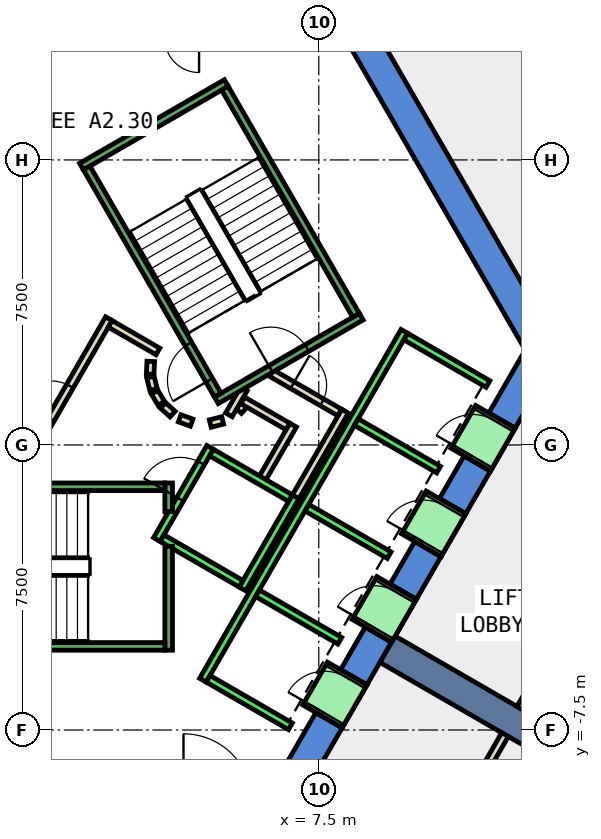
"""IFC4 building model, lengths in metres.
Left out: names, types, materials, properties, quantities, classifications, styles, units other than length and angle.
Written with IfcOpenShell. Run it as: python <this file> out.ifc"""

import sys

from ifc_helpers import new_model, si_unit, direction, frame, frame_2d, origin, place, context, subcontext, project, spatial, polyline, rectangle, outline, extrude, element, fill, save


model = new_model("IFC4")
c1 = context("Model", 3, precision=1e-05, world=origin(), true_north=direction((0.0, 1.0)))
c2 = subcontext(c1, "Body", "Model", "MODEL_VIEW")
j1 = project(units=[si_unit("LENGTHUNIT", "METRE"), si_unit("PLANEANGLEUNIT", "RADIAN")], contexts=[c1])
p1 = place(None, origin())
s1 = spatial("IfcSite", under=j1, at=p1, CompositionType="ELEMENT")
p2 = place(p1, origin())
s2 = spatial("IfcBuilding", under=s1, at=p2, CompositionType="ELEMENT")
p3 = place(p2, frame((0.0, 0.0, 146.6)))
s3 = spatial("IfcBuildingStorey", under=s2, at=p3, CompositionType="ELEMENT", Elevation=146.6)
p4 = place(p3, frame((0.0, 0.0, -0.4)))
e1 = element("IfcWall", 1, at=p4, inside=s3, PredefinedType="SHEAR", context=c2, shape_type="SweptSolid", body=[
    extrude(outline(polyline([(8.517, 11.748), (7.824, 11.348), (12.933, 2.5), (13.856, 2.5), (8.517, 11.748)])), origin(), (0.0, 0.0, 1.0), 4.2),
])
p5 = place(p3, frame((0.0, 0.0, -0.4)))
e2 = element("IfcWall", 2, at=p5, inside=s3, PredefinedType="SHEAR", context=c2, shape_type="SweptSolid", body=[
    extrude(outline(polyline([(8.117, -7.44), (7.424, -7.04), (6.466, -8.7), (6.928, -9.5), (8.117, -7.44)])), origin(), (0.0, 0.0, 1.0), 4.2),
])
p6 = place(p3, frame((0.0, 0.0, -0.4)))
e3 = element("IfcWall", 3, at=p6, inside=s3, PredefinedType="SHEAR", context=c2, shape_type="SweptSolid", body=[
    extrude(outline(polyline([(9.417, -5.189), (8.724, -4.789), (8.075, -5.914), (8.767, -6.314), (9.417, -5.189)])), origin(), (0.0, 0.0, 1.0), 4.2),
])
p7 = place(p3, frame((0.0, 0.0, -0.4)))
e4 = element("IfcWall", 4, at=p7, inside=s3, PredefinedType="SHEAR", context=c2, shape_type="SweptSolid", body=[
    extrude(outline(polyline([(10.717, -2.937), (10.025, -2.537), (9.374, -3.663), (10.067, -4.063), (10.717, -2.937)])), origin(), (0.0, 0.0, 1.0), 4.2),
])
p8 = place(p3, frame((0.0, 0.0, -0.4)))
e5 = element("IfcWall", 5, at=p8, inside=s3, PredefinedType="SHEAR", context=c2, shape_type="SweptSolid", body=[
    extrude(outline(polyline([(12.017, -0.686), (11.324, -0.286), (10.675, -1.411), (11.367, -1.811), (12.017, -0.686)])), origin(), (0.0, 0.0, 1.0), 4.2),
])
p9 = place(p3, frame((0.0, 0.0, -0.4)))
e6 = element("IfcWall", 6, at=p9, inside=s3, PredefinedType="SHEAR", context=c2, shape_type="SweptSolid", body=[
    extrude(outline(polyline([(11.974, 0.84), (12.667, 0.44), (13.856, 2.5), (12.933, 2.5), (11.974, 0.84)])), origin(), (0.0, 0.0, 1.0), 4.2),
])
p10 = place(p3, frame((0.0, 0.0, 3.6)))
e7 = element("IfcWall", 7, at=p10, inside=s3, PredefinedType="SHEAR", context=c2, shape_type="SweptSolid", body=[
    extrude(outline(polyline([(8.767, -6.314), (8.075, -5.914), (7.424, -7.04), (8.117, -7.44), (8.767, -6.314)])), origin(), (0.0, 0.0, 1.0), 0.2),
])
p11 = place(p3, frame((0.0, 0.0, 3.6)))
e8 = element("IfcWall", 8, at=p11, inside=s3, PredefinedType="SHEAR", context=c2, shape_type="SweptSolid", body=[
    extrude(outline(polyline([(10.067, -4.063), (9.374, -3.663), (8.724, -4.789), (9.417, -5.189), (10.067, -4.063)])), origin(), (0.0, 0.0, 1.0), 0.2),
])
p12 = place(p3, frame((0.0, 0.0, 3.6)))
e9 = element("IfcWall", 9, at=p12, inside=s3, PredefinedType="SHEAR", context=c2, shape_type="SweptSolid", body=[
    extrude(outline(polyline([(11.367, -1.811), (10.675, -1.411), (10.025, -2.537), (10.717, -2.937), (11.367, -1.811)])), origin(), (0.0, 0.0, 1.0), 0.2),
])
p13 = place(p3, frame((0.0, 0.0, 3.6)))
e10 = element("IfcWall", 10, at=p13, inside=s3, PredefinedType="SHEAR", context=c2, shape_type="SweptSolid", body=[
    extrude(outline(polyline([(12.667, 0.44), (11.974, 0.84), (11.324, -0.286), (12.017, -0.686), (12.667, 0.44)])), origin(), (0.0, 0.0, 1.0), 0.2),
])
p14 = place(p3, frame((9.31, -5.375, -0.4), z_axis=(0.0, 0.0, 1.0), x_axis=(0.866017533419, -0.500013631625, 0.0)))
e11 = element("IfcWall", 11, at=p14, inside=s3, PredefinedType="SHEAR", context=c2, shape_type="SweptSolid", body=[
    extrude(rectangle(XDim=9.0, YDim=0.8, at=frame_2d((4.5, 0.0))), origin(), (0.0, 0.0, 1.0), 4.2),
])
p15 = place(p3, frame((5.39, 0.898, 0.0), z_axis=(0.0, 0.0, 1.0), x_axis=(0.673828488714, 0.738887791073, 0.0)))
e12 = element("IfcWall", 12, at=p15, inside=s3, PredefinedType="PARTITIONING", context=c2, shape_type="SweptSolid", body=[
    extrude(rectangle(XDim=0.263, YDim=0.2, at=frame_2d((0.131, 0.0))), origin(), (0.0, 0.0, 1.0), 3.8),
])
p16 = place(p3, frame((5.499, 1.172, 0.0), z_axis=(0.0, 0.0, 1.0), x_axis=(0.866333505267, -0.499465972466, 0.0)))
e13 = element("IfcWall", 13, at=p16, inside=s3, PredefinedType="PARTITIONING", context=c2, shape_type="SweptSolid", body=[
    extrude(rectangle(XDim=1.374, YDim=0.2, at=frame_2d((0.687, 0.0))), origin(), (0.0, 0.0, 1.0), 3.8),
])
p17 = place(p3, frame((6.826, 0.522, 0.0), z_axis=(0.0, 0.0, 1.0), x_axis=(-0.500016722714, -0.866015748706, 0.0)))
e14 = element("IfcWall", 14, at=p17, inside=s3, PredefinedType="PARTITIONING", context=c2, shape_type="SweptSolid", body=[
    extrude(rectangle(XDim=1.7, YDim=0.2, at=frame_2d((0.85, 0.0))), origin(), (0.0, 0.0, 1.0), 3.8),
])
p18 = place(p3, frame((6.25, 1.894, 0.0), z_axis=(0.0, 0.0, 1.0), x_axis=(0.866043184279, -0.499969202016, 0.0)))
e15 = element("IfcWall", 15, at=p18, inside=s3, PredefinedType="PARTITIONING", context=c2, shape_type="SweptSolid", body=[
    extrude(rectangle(XDim=2.084, YDim=0.2, at=frame_2d((1.042, 0.0))), origin(), (0.0, 0.0, 1.0), 3.8),
])
p19 = place(p18, frame((0.642, 0.0, 0.0)))
e16 = element("IfcOpeningElement", 16, at=p19, cuts=e15, PredefinedType="OPENING", context=c2, shape_type="SweptSolid", body=[
    extrude(rectangle(XDim=0.9, YDim=2.1, at=frame_2d((0.45, 1.05))), frame((0.0, 0.11, 0.0), z_axis=(0.0, -1.0, 0.0), x_axis=(1.0, 0.0, 0.0)), (0.0, 0.0, 1.0), 0.22),
])
p20 = place(p3, frame((8.192, 0.888, 0.0), z_axis=(0.0, 0.0, 1.0), x_axis=(-0.499940625693, -0.866059680843, 0.0)))
e17 = element("IfcWall", 17, at=p20, inside=s3, PredefinedType="PARTITIONING", context=c2, shape_type="SweptSolid", body=[
    extrude(rectangle(XDim=2.68, YDim=0.2, at=frame_2d((1.34, 0.0))), origin(), (0.0, 0.0, 1.0), 3.8),
])
p21 = place(p3, frame((5.135, 0.793, 0.0), z_axis=(0.0, 0.0, 1.0), x_axis=(0.499526442893, 0.866298639529, 0.0)))
e18 = element("IfcWall", 18, at=p21, inside=s3, PredefinedType="PARTITIONING", context=c2, shape_type="SweptSolid", body=[
    extrude(rectangle(XDim=0.791, YDim=0.2, at=frame_2d((0.396, 0.0))), origin(), (0.0, 0.0, 1.0), 3.8),
])
p22 = place(p3, frame((-0.52, -1.0, 0.0), z_axis=(0.0, 0.0, 1.0), x_axis=(0.50011622646, 0.865958290007, 0.0)))
e19 = element("IfcWall", 19, at=p22, inside=s3, PredefinedType="PARTITIONING", context=c2, shape_type="SweptSolid", body=[
    extrude(rectangle(XDim=4.991, YDim=0.2, at=frame_2d((2.496, 0.0))), origin(), (0.0, 0.0, 1.0), 3.8),
])
p23 = place(p22, frame((1.945, 0.0, 0.0)))
e20 = element("IfcOpeningElement", 20, at=p23, cuts=e19, PredefinedType="OPENING", context=c2, shape_type="SweptSolid", body=[
    extrude(rectangle(XDim=1.0, YDim=2.1, at=frame_2d((0.5, 1.05))), frame((0.0, 0.11, 0.0), z_axis=(0.0, -1.0, 0.0), x_axis=(1.0, 0.0, 0.0)), (0.0, 0.0, 1.0), 0.22),
])
p24 = place(p3, frame((2.012, 3.186, 0.0), z_axis=(0.0, 0.0, 1.0), x_axis=(0.865891012941, -0.500232699559, 0.0)))
e21 = element("IfcWall", 21, at=p24, inside=s3, PredefinedType="PARTITIONING", context=c2, shape_type="SweptSolid", body=[
    extrude(rectangle(XDim=1.449, YDim=0.2, at=frame_2d((0.725, 0.0))), origin(), (0.0, 0.0, 1.0), 3.8),
])
p25 = place(p3, frame((3.079, 2.199, 0.0), z_axis=(0.0, 0.0, 1.0), x_axis=(-0.047771483479, -0.998858290933, 0.0)))
e22 = element("IfcWall", 22, at=p25, inside=s3, PredefinedType="PARTITIONING", context=c2, shape_type="SweptSolid", body=[
    extrude(rectangle(XDim=0.337, YDim=0.2, at=frame_2d((0.169, 0.0))), origin(), (0.0, 0.0, 1.0), 3.8),
])
p26 = place(p3, frame((3.07, 1.786, 0.0), z_axis=(0.0, 0.0, 1.0), x_axis=(0.242705583207, -0.970099994784, 0.0)))
e23 = element("IfcWall", 23, at=p26, inside=s3, PredefinedType="PARTITIONING", context=c2, shape_type="SweptSolid", body=[
    extrude(rectangle(XDim=0.338, YDim=0.2, at=frame_2d((0.169, 0.0))), origin(), (0.0, 0.0, 1.0), 3.8),
])
for number, where, z_axis, x_axis in (
    (24, (3.182, 1.388, 0.0), (0.0, 0.0, 1.0), (0.512, -0.859, 0.0)),
    (25, (3.404, 1.039, 0.0), (0.0, 0.0, 1.0), (0.74, -0.672, 0.0)),
):
    element("IfcWall", number, at=place(p3, frame(where, z_axis=z_axis, x_axis=x_axis)), inside=s3, PredefinedType="PARTITIONING", context=c2, shape_type="SweptSolid", body=[
        extrude(rectangle(XDim=0.338, YDim=0.2, at=frame_2d((0.169, 0.0))), origin(), (0.0, 0.0, 1.0), 3.8),
    ])
p27 = place(p3, frame((3.838, 0.702, 0.0), z_axis=(0.0, 0.0, 1.0), x_axis=(0.941035081519, -0.338308993895, 0.0)))
e26 = element("IfcWall", 26, at=p27, inside=s3, PredefinedType="PARTITIONING", context=c2, shape_type="SweptSolid", body=[
    extrude(rectangle(XDim=0.337, YDim=0.2, at=frame_2d((0.168, 0.0))), origin(), (0.0, 0.0, 1.0), 3.8),
])
p28 = place(p3, frame((4.644, 0.564, 0.0), z_axis=(0.0, 0.0, 1.0), x_axis=(0.969929076366, 0.243387729394, 0.0)))
e27 = element("IfcWall", 27, at=p28, inside=s3, PredefinedType="PARTITIONING", context=c2, shape_type="SweptSolid", body=[
    extrude(rectangle(XDim=0.337, YDim=0.2, at=frame_2d((0.168, 0.0))), origin(), (0.0, 0.0, 1.0), 3.8),
])
p29 = place(p3, frame((13.535, -5.657, 0.0), z_axis=(0.0, 0.0, 1.0), x_axis=(-0.499751238113, -0.866168978898, 0.0)))
e28 = element("IfcWall", 28, at=p29, inside=s3, PredefinedType="PARTITIONING", context=c2, shape_type="SweptSolid", body=[
    extrude(rectangle(XDim=1.469, YDim=0.2, at=frame_2d((0.734, 0.0))), origin(), (0.0, 0.0, 1.0), 3.8),
])
p30 = place(p3, frame((12.401, -7.621, 0.0), z_axis=(0.0, 0.0, 1.0), x_axis=(-0.499964151829, -0.866046099747, 0.0)))
e29 = element("IfcWall", 29, at=p30, inside=s3, PredefinedType="PARTITIONING", context=c2, shape_type="SweptSolid", body=[
    extrude(rectangle(XDim=8.656, YDim=0.2, at=frame_2d((4.328, 0.0))), origin(), (0.0, 0.0, 1.0), 3.8),
])
p31 = place(p30, frame((2.694, 0.0, 0.0)))
e30 = element("IfcOpeningElement", 30, at=p31, cuts=e29, PredefinedType="OPENING", context=c2, shape_type="SweptSolid", body=[
    extrude(rectangle(XDim=1.0, YDim=2.1, at=frame_2d((0.5, 1.05))), frame((0.0, 0.11, 0.0), z_axis=(0.0, -1.0, 0.0), x_axis=(1.0, 0.0, 0.0)), (0.0, 0.0, 1.0), 0.22),
])
p32 = place(p30, frame((3.794, 0.0, 0.0)))
e31 = element("IfcOpeningElement", 31, at=p32, cuts=e29, PredefinedType="OPENING", context=c2, shape_type="SweptSolid", body=[
    extrude(rectangle(XDim=1.0, YDim=2.1, at=frame_2d((0.5, 1.05))), frame((0.0, 0.11, 0.0), z_axis=(0.0, -1.0, 0.0), x_axis=(1.0, 0.0, 0.0)), (0.0, 0.0, 1.0), 0.22),
])
p33 = place(p3, frame((3.24, -2.488, 0.0), z_axis=(0.0, 0.0, 1.0), x_axis=(0.49994636267, 0.866056369097, 0.0)))
e32 = element("IfcWall", 32, at=p33, inside=s3, PredefinedType="STANDARD", context=c2, shape_type="SweptSolid", body=[
    extrude(rectangle(XDim=2.8, YDim=0.2, at=frame_2d((1.4, 0.0))), origin(), (0.0, 0.0, 1.0), 3.8),
])
p34 = place(p33, frame((1.225, 0.0, 0.0)))
e33 = element("IfcOpeningElement", 33, at=p34, cuts=e32, PredefinedType="OPENING", context=c2, shape_type="SweptSolid", body=[
    extrude(rectangle(XDim=1.1, YDim=2.1, at=frame_2d((0.55, 1.05))), frame((0.0, 0.11, 0.0), z_axis=(0.0, -1.0, 0.0), x_axis=(1.0, 0.0, 0.0)), (0.0, 0.0, 1.0), 0.22),
])
p35 = place(p3, frame((5.492, -3.788, 0.0), z_axis=(0.0, 0.0, 1.0), x_axis=(0.500011755427, 0.866018616679, 0.0)))
e34 = element("IfcWall", 34, at=p35, inside=s3, PredefinedType="STANDARD", context=c2, shape_type="SweptSolid", body=[
    extrude(rectangle(XDim=2.8, YDim=0.2, at=frame_2d((1.4, 0.0))), origin(), (0.0, 0.0, 1.0), 3.8),
])
p36 = place(p3, frame((3.377, -2.452, 0.0), z_axis=(0.0, 0.0, 1.0), x_axis=(0.865955154139, -0.50012165622, 0.0)))
e35 = element("IfcWall", 35, at=p36, inside=s3, PredefinedType="STANDARD", context=c2, shape_type="SweptSolid", body=[
    extrude(rectangle(XDim=2.4, YDim=0.2, at=frame_2d((1.2, 0.0))), origin(), (0.0, 0.0, 1.0), 3.8),
])
p37 = place(p3, frame((4.677, -0.2, 0.0), z_axis=(0.0, 0.0, 1.0), x_axis=(0.865973769406, -0.500089422704, 0.0)))
e36 = element("IfcWall", 36, at=p37, inside=s3, PredefinedType="STANDARD", context=c2, shape_type="SweptSolid", body=[
    extrude(rectangle(XDim=2.399, YDim=0.2, at=frame_2d((1.2, 0.0))), origin(), (0.0, 0.0, 1.0), 3.8),
])
p38 = place(p3, frame((4.451, -6.19, 0.0), z_axis=(0.0, 0.0, 1.0), x_axis=(0.50000090737, 0.866024879913, 0.0)))
e37 = element("IfcWall", 37, at=p38, inside=s3, PredefinedType="STANDARD", context=c2, shape_type="SweptSolid", body=[
    extrude(rectangle(XDim=10.6, YDim=0.2, at=frame_2d((5.3, 0.0))), origin(), (0.0, 0.0, 1.0), 3.8),
])
for number, where, z_axis, x_axis in (
    (38, (4.588, -6.153, 0.0), (0.0, 0.0, 1.0), (0.866, -0.5, 0.0)),
    (39, (5.888, -3.902, 0.0), (0.0, 0.0, 1.0), (0.866, -0.5, 0.0)),
    (40, (7.188, -1.65, 0.0), (0.0, 0.0, 1.0), (0.866, -0.5, 0.0)),
    (41, (8.488, 0.602, 0.0), (0.0, 0.0, 1.0), (0.866, -0.5, 0.0)),
):
    element("IfcWall", number, at=place(p3, frame(where, z_axis=z_axis, x_axis=x_axis)), inside=s3, PredefinedType="STANDARD", context=c2, shape_type="SweptSolid", body=[
        extrude(rectangle(XDim=2.5, YDim=0.2, at=frame_2d((1.25, 0.0))), origin(), (0.0, 0.0, 1.0), 3.8),
    ])
p39 = place(p3, frame((9.788, 2.853, 0.0), z_axis=(0.0, 0.0, 1.0), x_axis=(0.865998541277, -0.500046524342, 0.0)))
e42 = element("IfcWall", 42, at=p39, inside=s3, PredefinedType="STANDARD", context=c2, shape_type="SweptSolid", body=[
    extrude(rectangle(XDim=2.5, YDim=0.2, at=frame_2d((1.25, 0.0))), origin(), (0.0, 0.0, 1.0), 3.8),
])
p40 = place(p3, frame((7.598, -7.14, 0.0), z_axis=(0.0, 0.0, 1.0), x_axis=(0.500362116554, 0.865816234728, 0.0)))
e43 = element("IfcWall", 43, at=p40, inside=s3, PredefinedType="STANDARD", context=c2, shape_type="SweptSolid", body=[
    extrude(rectangle(XDim=1.299, YDim=1.2, at=frame_2d((0.65, 0.0))), origin(), (0.0, 0.0, 1.0), 2.4),
])
p41 = place(p40, frame((0.1, 0.0, 0.0)))
e44 = element("IfcOpeningElement", 44, at=p41, cuts=e43, PredefinedType="OPENING", context=c2, shape_type="SweptSolid", body=[
    extrude(rectangle(XDim=1.1, YDim=2.3, at=frame_2d((0.55, 1.15))), frame((0.0, 0.61, 0.0), z_axis=(0.0, -1.0, 0.0), x_axis=(1.0, 0.0, 0.0)), (0.0, 0.0, 1.0), 1.22),
])
p42 = place(p3, frame((8.898, -4.889, 0.0), z_axis=(0.0, 0.0, 1.0), x_axis=(0.500036693733, 0.866004217611, 0.0)))
e45 = element("IfcWall", 45, at=p42, inside=s3, PredefinedType="STANDARD", context=c2, shape_type="SweptSolid", body=[
    extrude(rectangle(XDim=1.3, YDim=1.2, at=frame_2d((0.65, 0.0))), origin(), (0.0, 0.0, 1.0), 2.4),
])
p43 = place(p42, frame((0.1, 0.0, 0.0)))
e46 = element("IfcOpeningElement", 46, at=p43, cuts=e45, PredefinedType="OPENING", context=c2, shape_type="SweptSolid", body=[
    extrude(rectangle(XDim=1.1, YDim=2.3, at=frame_2d((0.55, 1.15))), frame((0.0, 0.61, 0.0), z_axis=(0.0, -1.0, 0.0), x_axis=(1.0, 0.0, 0.0)), (0.0, 0.0, 1.0), 1.22),
])
p44 = place(p3, frame((10.198, -2.637, 0.0), z_axis=(0.0, 0.0, 1.0), x_axis=(0.49989585183, 0.866085525409, 0.0)))
e47 = element("IfcWall", 47, at=p44, inside=s3, PredefinedType="STANDARD", context=c2, shape_type="SweptSolid", body=[
    extrude(rectangle(XDim=1.3, YDim=1.2, at=frame_2d((0.65, 0.0))), origin(), (0.0, 0.0, 1.0), 2.4),
])
p45 = place(p44, frame((0.1, 0.0, 0.0)))
e48 = element("IfcOpeningElement", 48, at=p45, cuts=e47, PredefinedType="OPENING", context=c2, shape_type="SweptSolid", body=[
    extrude(rectangle(XDim=1.1, YDim=2.3, at=frame_2d((0.55, 1.15))), frame((0.0, 0.61, 0.0), z_axis=(0.0, -1.0, 0.0), x_axis=(1.0, 0.0, 0.0)), (0.0, 0.0, 1.0), 1.22),
])
p46 = place(p3, frame((11.498, -0.385, 0.0), z_axis=(0.0, 0.0, 1.0), x_axis=(0.500221244143, 0.865897630733, 0.0)))
e49 = element("IfcWall", 49, at=p46, inside=s3, PredefinedType="STANDARD", context=c2, shape_type="SweptSolid", body=[
    extrude(rectangle(XDim=1.299, YDim=1.2, at=frame_2d((0.65, 0.0))), origin(), (0.0, 0.0, 1.0), 2.4),
])
p47 = place(p46, frame((0.1, 0.0, 0.0)))
e50 = element("IfcOpeningElement", 50, at=p47, cuts=e49, PredefinedType="OPENING", context=c2, shape_type="SweptSolid", body=[
    extrude(rectangle(XDim=1.1, YDim=2.3, at=frame_2d((0.55, 1.15))), frame((0.0, 0.61, 0.0), z_axis=(0.0, -1.0, 0.0), x_axis=(1.0, 0.0, 0.0)), (0.0, 0.0, 1.0), 1.22),
])
p48 = place(p3, frame((3.55, -2.667, 0.0), z_axis=(0.0, 0.0, 1.0), x_axis=(0.0, -1.0, 0.0)))
e51 = element("IfcWall", 51, at=p48, inside=s3, PredefinedType="STANDARD", context=c2, shape_type="SweptSolid", body=[
    extrude(rectangle(XDim=2.733, YDim=0.2, at=frame_2d((1.366, 0.0))), origin(), (0.0, 0.0, 1.0), 3.8),
])
p49 = place(p3, frame((3.55, -1.0, 0.0), z_axis=(0.0, 0.0, 1.0), x_axis=(0.0, -1.0, 0.0)))
e52 = element("IfcWall", 52, at=p49, inside=s3, PredefinedType="STANDARD", context=c2, shape_type="SweptSolid", body=[
    extrude(rectangle(XDim=0.751, YDim=0.2, at=frame_2d((0.375, 0.0))), origin(), (0.0, 0.0, 1.0), 3.8),
])
p50 = place(p3, frame((-3.45, -1.1, 0.0), z_axis=(0.0, 0.0, 1.0), x_axis=(1.0, 0.0, 0.0)))
e53 = element("IfcWall", 53, at=p50, inside=s3, PredefinedType="STANDARD", context=c2, shape_type="SweptSolid", body=[
    extrude(rectangle(XDim=6.9, YDim=0.2, at=frame_2d((3.45, 0.0))), origin(), (0.0, 0.0, 1.0), 3.8),
])
p51 = place(p50, frame((0.45, 0.0, 0.0)))
e54 = element("IfcOpeningElement", 54, at=p51, cuts=e53, PredefinedType="OPENING", context=c2, shape_type="SweptSolid", body=[
    extrude(rectangle(XDim=1.1, YDim=2.2, at=frame_2d((0.55, 1.1))), frame((0.0, 0.11, 0.0), z_axis=(0.0, -1.0, 0.0), x_axis=(1.0, 0.0, 0.0)), (0.0, 0.0, 1.0), 0.22),
])
p52 = place(p3, frame((-3.45, -5.3, 0.0), z_axis=(0.0, 0.0, 1.0), x_axis=(1.0, 0.0, 0.0)))
e55 = element("IfcWall", 55, at=p52, inside=s3, PredefinedType="STANDARD", context=c2, shape_type="SweptSolid", body=[
    extrude(rectangle(XDim=6.9, YDim=0.2, at=frame_2d((3.45, 0.0))), origin(), (0.0, 0.0, 1.0), 3.8),
])
p53 = place(p3, frame((4.806, 1.176, 0.0), z_axis=(0.0, 0.0, 1.0), x_axis=(0.866059941101, 0.499940174841, 0.0)))
e56 = element("IfcWall", 56, at=p53, inside=s3, PredefinedType="STANDARD", context=c2, shape_type="SweptSolid", body=[
    extrude(rectangle(XDim=4.4, YDim=0.2, at=frame_2d((2.2, 0.0))), origin(), (0.0, 0.0, 1.0), 3.8),
])
p54 = place(p53, frame((1.65, 0.0, 0.0)))
e57 = element("IfcOpeningElement", 57, at=p54, cuts=e56, PredefinedType="OPENING", context=c2, shape_type="SweptSolid", body=[
    extrude(rectangle(XDim=1.1, YDim=2.2, at=frame_2d((0.55, 1.1))), frame((0.0, 0.11, 0.0), z_axis=(0.0, -1.0, 0.0), x_axis=(1.0, 0.0, 0.0)), (0.0, 0.0, 1.0), 0.22),
])
p55 = place(p3, frame((1.256, 7.324, 0.0), z_axis=(0.0, 0.0, 1.0), x_axis=(0.866046073146, 0.499964197906, 0.0)))
e58 = element("IfcWall", 58, at=p55, inside=s3, PredefinedType="STANDARD", context=c2, shape_type="SweptSolid", body=[
    extrude(rectangle(XDim=4.4, YDim=0.2, at=frame_2d((2.2, 0.0))), origin(), (0.0, 0.0, 1.0), 3.8),
])
p56 = place(p3, frame((4.843, 1.312, 0.0), z_axis=(0.0, 0.0, 1.0), x_axis=(-0.499963383562, 0.866046543262, 0.0)))
e59 = element("IfcWall", 59, at=p56, inside=s3, PredefinedType="STANDARD", context=c2, shape_type="SweptSolid", body=[
    extrude(rectangle(XDim=6.9, YDim=0.2, at=frame_2d((3.45, 0.0))), origin(), (0.0, 0.0, 1.0), 3.8),
])
p57 = place(p56, frame((0.45, 0.0, 0.0)))
e60 = element("IfcOpeningElement", 60, at=p57, cuts=e59, PredefinedType="OPENING", context=c2, shape_type="SweptSolid", body=[
    extrude(rectangle(XDim=1.1, YDim=2.2, at=frame_2d((0.55, 1.1))), frame((0.0, 0.11, 0.0), z_axis=(0.0, -1.0, 0.0), x_axis=(1.0, 0.0, 0.0)), (0.0, 0.0, 1.0), 0.22),
])
p58 = place(p3, frame((8.48, 3.412, 0.0), z_axis=(0.0, 0.0, 1.0), x_axis=(-0.499978703459, 0.866037698999, 0.0)))
e61 = element("IfcWall", 61, at=p58, inside=s3, PredefinedType="STANDARD", context=c2, shape_type="SweptSolid", body=[
    extrude(rectangle(XDim=6.9, YDim=0.2, at=frame_2d((3.45, 0.0))), origin(), (0.0, 0.0, 1.0), 3.8),
])
p59 = place(p23, origin())
e62 = element("IfcDoor", 62, at=p59, inside=s3, OperationType="SINGLE_SWING_LEFT", PredefinedType="DOOR", context=c2, shape_type="SweptSolid", body=[
    extrude(rectangle(XDim=1.0, YDim=2.1, at=frame_2d((0.5, 1.05))), frame((0.0, 0.025, 0.0), z_axis=(0.0, -1.0, 0.0), x_axis=(1.0, 0.0, 0.0)), (0.0, 0.0, 1.0), 0.05),
])
fill(e20, e62)
p60 = place(p19, origin())
e63 = element("IfcDoor", 63, at=p60, inside=s3, OperationType="SINGLE_SWING_LEFT", PredefinedType="DOOR", context=c2, shape_type="SweptSolid", body=[
    extrude(rectangle(XDim=0.9, YDim=2.1, at=frame_2d((0.45, 1.05))), frame((0.0, 0.025, 0.0), z_axis=(0.0, -1.0, 0.0), x_axis=(1.0, 0.0, 0.0)), (0.0, 0.0, 1.0), 0.05),
])
fill(e16, e63)
p61 = place(p41, origin())
e64 = element("IfcDoor", 64, at=p61, inside=s3, OperationType="SLIDING_TO_LEFT", PredefinedType="DOOR", context=c2, shape_type="SweptSolid", body=[
    extrude(rectangle(XDim=1.1, YDim=2.3, at=frame_2d((0.55, 1.15))), frame((0.0, 0.025, 0.0), z_axis=(0.0, -1.0, 0.0), x_axis=(1.0, 0.0, 0.0)), (0.0, 0.0, 1.0), 0.05),
])
fill(e44, e64)
p62 = place(p43, origin())
e65 = element("IfcDoor", 65, at=p62, inside=s3, OperationType="SLIDING_TO_LEFT", PredefinedType="DOOR", context=c2, shape_type="SweptSolid", body=[
    extrude(rectangle(XDim=1.1, YDim=2.3, at=frame_2d((0.55, 1.15))), frame((0.0, 0.025, 0.0), z_axis=(0.0, -1.0, 0.0), x_axis=(1.0, 0.0, 0.0)), (0.0, 0.0, 1.0), 0.05),
])
fill(e46, e65)
p63 = place(p45, origin())
e66 = element("IfcDoor", 66, at=p63, inside=s3, OperationType="SLIDING_TO_LEFT", PredefinedType="DOOR", context=c2, shape_type="SweptSolid", body=[
    extrude(rectangle(XDim=1.1, YDim=2.3, at=frame_2d((0.55, 1.15))), frame((0.0, 0.025, 0.0), z_axis=(0.0, -1.0, 0.0), x_axis=(1.0, 0.0, 0.0)), (0.0, 0.0, 1.0), 0.05),
])
fill(e48, e66)
p64 = place(p47, origin())
e67 = element("IfcDoor", 67, at=p64, inside=s3, OperationType="SLIDING_TO_LEFT", PredefinedType="DOOR", context=c2, shape_type="SweptSolid", body=[
    extrude(rectangle(XDim=1.1, YDim=2.3, at=frame_2d((0.55, 1.15))), frame((0.0, 0.025, 0.0), z_axis=(0.0, -1.0, 0.0), x_axis=(1.0, 0.0, 0.0)), (0.0, 0.0, 1.0), 0.05),
])
fill(e50, e67)
p65 = place(p34, origin())
e68 = element("IfcDoor", 68, at=p65, inside=s3, OperationType="SLIDING_TO_LEFT", PredefinedType="DOOR", context=c2, shape_type="SweptSolid", body=[
    extrude(rectangle(XDim=1.1, YDim=2.1, at=frame_2d((0.55, 1.05))), frame((0.0, 0.025, 0.0), z_axis=(0.0, -1.0, 0.0), x_axis=(1.0, 0.0, 0.0)), (0.0, 0.0, 1.0), 0.05),
])
fill(e33, e68)
p66 = place(p57, origin())
e69 = element("IfcDoor", 69, at=p66, inside=s3, OperationType="SINGLE_SWING_LEFT", PredefinedType="DOOR", context=c2, shape_type="SweptSolid", body=[
    extrude(rectangle(XDim=1.1, YDim=2.2, at=frame_2d((0.55, 1.1))), frame((0.0, 0.025, 0.0), z_axis=(0.0, -1.0, 0.0), x_axis=(1.0, 0.0, 0.0)), (0.0, 0.0, 1.0), 0.05),
])
fill(e60, e69)
p67 = place(p54, origin())
e70 = element("IfcDoor", 70, at=p67, inside=s3, OperationType="SINGLE_SWING_LEFT", PredefinedType="DOOR", context=c2, shape_type="SweptSolid", body=[
    extrude(rectangle(XDim=1.1, YDim=2.2, at=frame_2d((0.55, 1.1))), frame((0.0, 0.025, 0.0), z_axis=(0.0, -1.0, 0.0), x_axis=(1.0, 0.0, 0.0)), (0.0, 0.0, 1.0), 0.05),
])
fill(e57, e70)
save(model, sys.argv[1])
